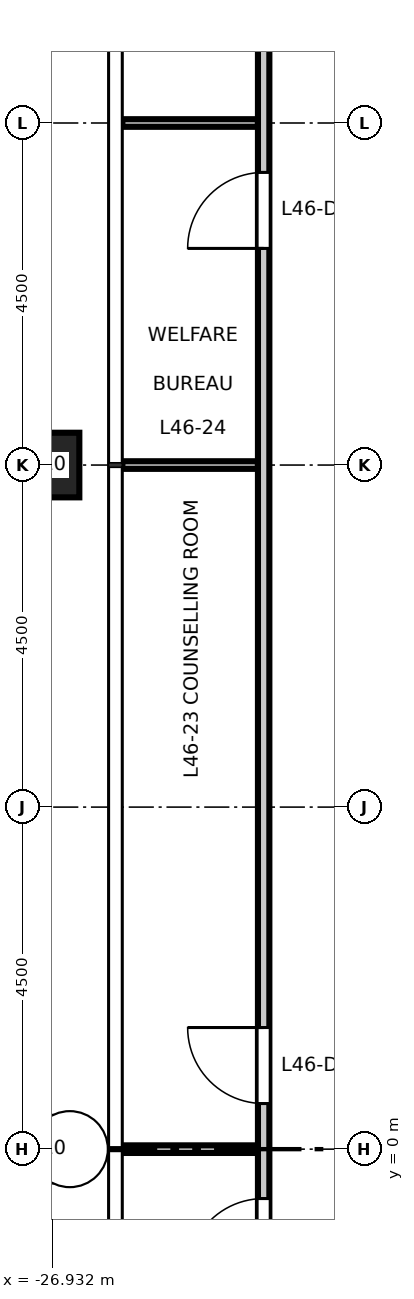
"""IFC4 building model, lengths in metres.
Left out: names, types, materials, properties, quantities, classifications, styles, units other than length and angle.
Written with IfcOpenShell. Run it as: python <this file> out.ifc"""

import sys

from ifc_helpers import new_model, si_unit, direction, frame, frame_2d, origin, origin_2d, place, context, subcontext, project, spatial, rectangle, hollow_rectangle, extrude, element, fill, save


model = new_model("IFC4")
c1 = context("Model", 3, precision=1e-05, world=origin(), true_north=direction((0.0, 1.0)))
c2 = subcontext(c1, "Body", "Model", "MODEL_VIEW")
j1 = project(units=[si_unit("LENGTHUNIT", "METRE"), si_unit("PLANEANGLEUNIT", "RADIAN")], contexts=[c1])
p1 = place(None, origin())
s1 = spatial("IfcSite", under=j1, at=p1, CompositionType="ELEMENT")
p2 = place(p1, origin())
s2 = spatial("IfcBuilding", under=s1, at=p2, CompositionType="ELEMENT")
p3 = place(p2, frame((0.0, 0.0, 215.2)))
s3 = spatial("IfcBuildingStorey", under=s2, at=p3, CompositionType="ELEMENT", Elevation=215.2)
for number, where, z_axis, x_axis in (
    (1, (-27.0, 9.0, 0.0), (0.0, 0.0, 1.0), (1.0, 0.0, 0.0)),
    (2, (-27.0, 0.0, 0.0), (0.0, 0.0, 1.0), (1.0, 0.0, 0.0)),
):
    element("IfcColumn", number, at=place(p3, frame(where, z_axis=z_axis, x_axis=x_axis)), inside=s3, PredefinedType="COLUMN", context=c2, shape_type="SweptSolid", body=[
        extrude(hollow_rectangle(XDim=0.85, YDim=0.85, WallThickness=0.05, at=origin_2d()), origin(), (0.0, 0.0, 1.0), 4.5),
    ])
for number, where, z_axis, x_axis in (
    (3, (-26.01, 0.0, 0.0), (0.0, 0.0, 1.0), (1.0, 0.0, 0.0)),
    (4, (-26.01, 9.0, 0.0), (0.0, 0.0, 1.0), (1.0, 0.0, 0.0)),
    (5, (-26.01, 13.5, 0.0), (0.0, 0.0, 1.0), (1.0, 0.0, 0.0)),
):
    element("IfcWall", number, at=place(p3, frame(where, z_axis=z_axis, x_axis=x_axis)), inside=s3, PredefinedType="PARTITIONING", context=c2, shape_type="SweptSolid", body=[
        extrude(rectangle(XDim=1.785, YDim=0.1, at=frame_2d((0.893, 0.0))), origin(), (0.0, 0.0, 1.0), 4.35),
    ])
p4 = place(p3, frame((-24.15, -15.825, 0.0), z_axis=(0.0, 0.0, 1.0), x_axis=(0.0, 1.0, 0.0)))
e6 = element("IfcWall", 6, at=p4, inside=s3, PredefinedType="PARTITIONING", context=c2, shape_type="SweptSolid", body=[
    extrude(rectangle(XDim=31.65, YDim=0.15, at=frame_2d((15.825, 0.0))), origin(), (0.0, 0.0, 1.0), 4.35),
])
p5 = place(p4, frame((2.925, 0.0, 0.0)))
e7 = element("IfcOpeningElement", 7, at=p5, cuts=e6, PredefinedType="OPENING", context=c2, shape_type="SweptSolid", body=[
    extrude(rectangle(XDim=1.0, YDim=2.1, at=frame_2d((0.5, 1.05))), frame((0.0, 0.085, 0.0), z_axis=(0.0, -1.0, 0.0), x_axis=(1.0, 0.0, 0.0)), (0.0, 0.0, 1.0), 0.17),
])
p6 = place(p4, frame((14.175, 0.0, 0.0)))
e8 = element("IfcOpeningElement", 8, at=p6, cuts=e6, PredefinedType="OPENING", context=c2, shape_type="SweptSolid", body=[
    extrude(rectangle(XDim=1.0, YDim=2.1, at=frame_2d((0.5, 1.05))), frame((0.0, 0.085, 0.0), z_axis=(0.0, -1.0, 0.0), x_axis=(1.0, 0.0, 0.0)), (0.0, 0.0, 1.0), 0.17),
])
p7 = place(p4, frame((16.425, 0.0, 0.0)))
e9 = element("IfcOpeningElement", 9, at=p7, cuts=e6, PredefinedType="OPENING", context=c2, shape_type="SweptSolid", body=[
    extrude(rectangle(XDim=1.0, YDim=2.1, at=frame_2d((0.5, 1.05))), frame((0.0, 0.085, 0.0), z_axis=(0.0, -1.0, 0.0), x_axis=(1.0, 0.0, 0.0)), (0.0, 0.0, 1.0), 0.17),
])
p8 = place(p4, frame((27.675, 0.0, 0.0)))
e10 = element("IfcOpeningElement", 10, at=p8, cuts=e6, PredefinedType="OPENING", context=c2, shape_type="SweptSolid", body=[
    extrude(rectangle(XDim=1.0, YDim=2.1, at=frame_2d((0.5, 1.05))), frame((0.0, 0.085, 0.0), z_axis=(0.0, -1.0, 0.0), x_axis=(1.0, 0.0, 0.0)), (0.0, 0.0, 1.0), 0.17),
])
p9 = place(p6, origin())
e11 = element("IfcDoor", 11, at=p9, inside=s3, OperationType="SINGLE_SWING_LEFT", PredefinedType="DOOR", context=c2, shape_type="SweptSolid", body=[
    extrude(rectangle(XDim=1.0, YDim=2.1, at=frame_2d((0.5, 1.05))), frame((0.0, 0.025, 0.0), z_axis=(0.0, -1.0, 0.0), x_axis=(1.0, 0.0, 0.0)), (0.0, 0.0, 1.0), 0.05),
])
fill(e8, e11)
p10 = place(p7, origin())
e12 = element("IfcDoor", 12, at=p10, inside=s3, OperationType="SINGLE_SWING_RIGHT", PredefinedType="DOOR", context=c2, shape_type="SweptSolid", body=[
    extrude(rectangle(XDim=1.0, YDim=2.1, at=frame_2d((0.5, 1.05))), frame((0.0, 0.025, 0.0), z_axis=(0.0, -1.0, 0.0), x_axis=(1.0, 0.0, 0.0)), (0.0, 0.0, 1.0), 0.05),
])
fill(e9, e12)
p11 = place(p8, origin())
e13 = element("IfcDoor", 13, at=p11, inside=s3, OperationType="SINGLE_SWING_LEFT", PredefinedType="DOOR", context=c2, shape_type="SweptSolid", body=[
    extrude(rectangle(XDim=1.0, YDim=2.1, at=frame_2d((0.5, 1.05))), frame((0.0, 0.025, 0.0), z_axis=(0.0, -1.0, 0.0), x_axis=(1.0, 0.0, 0.0)), (0.0, 0.0, 1.0), 0.05),
])
fill(e10, e13)
save(model, sys.argv[1])
